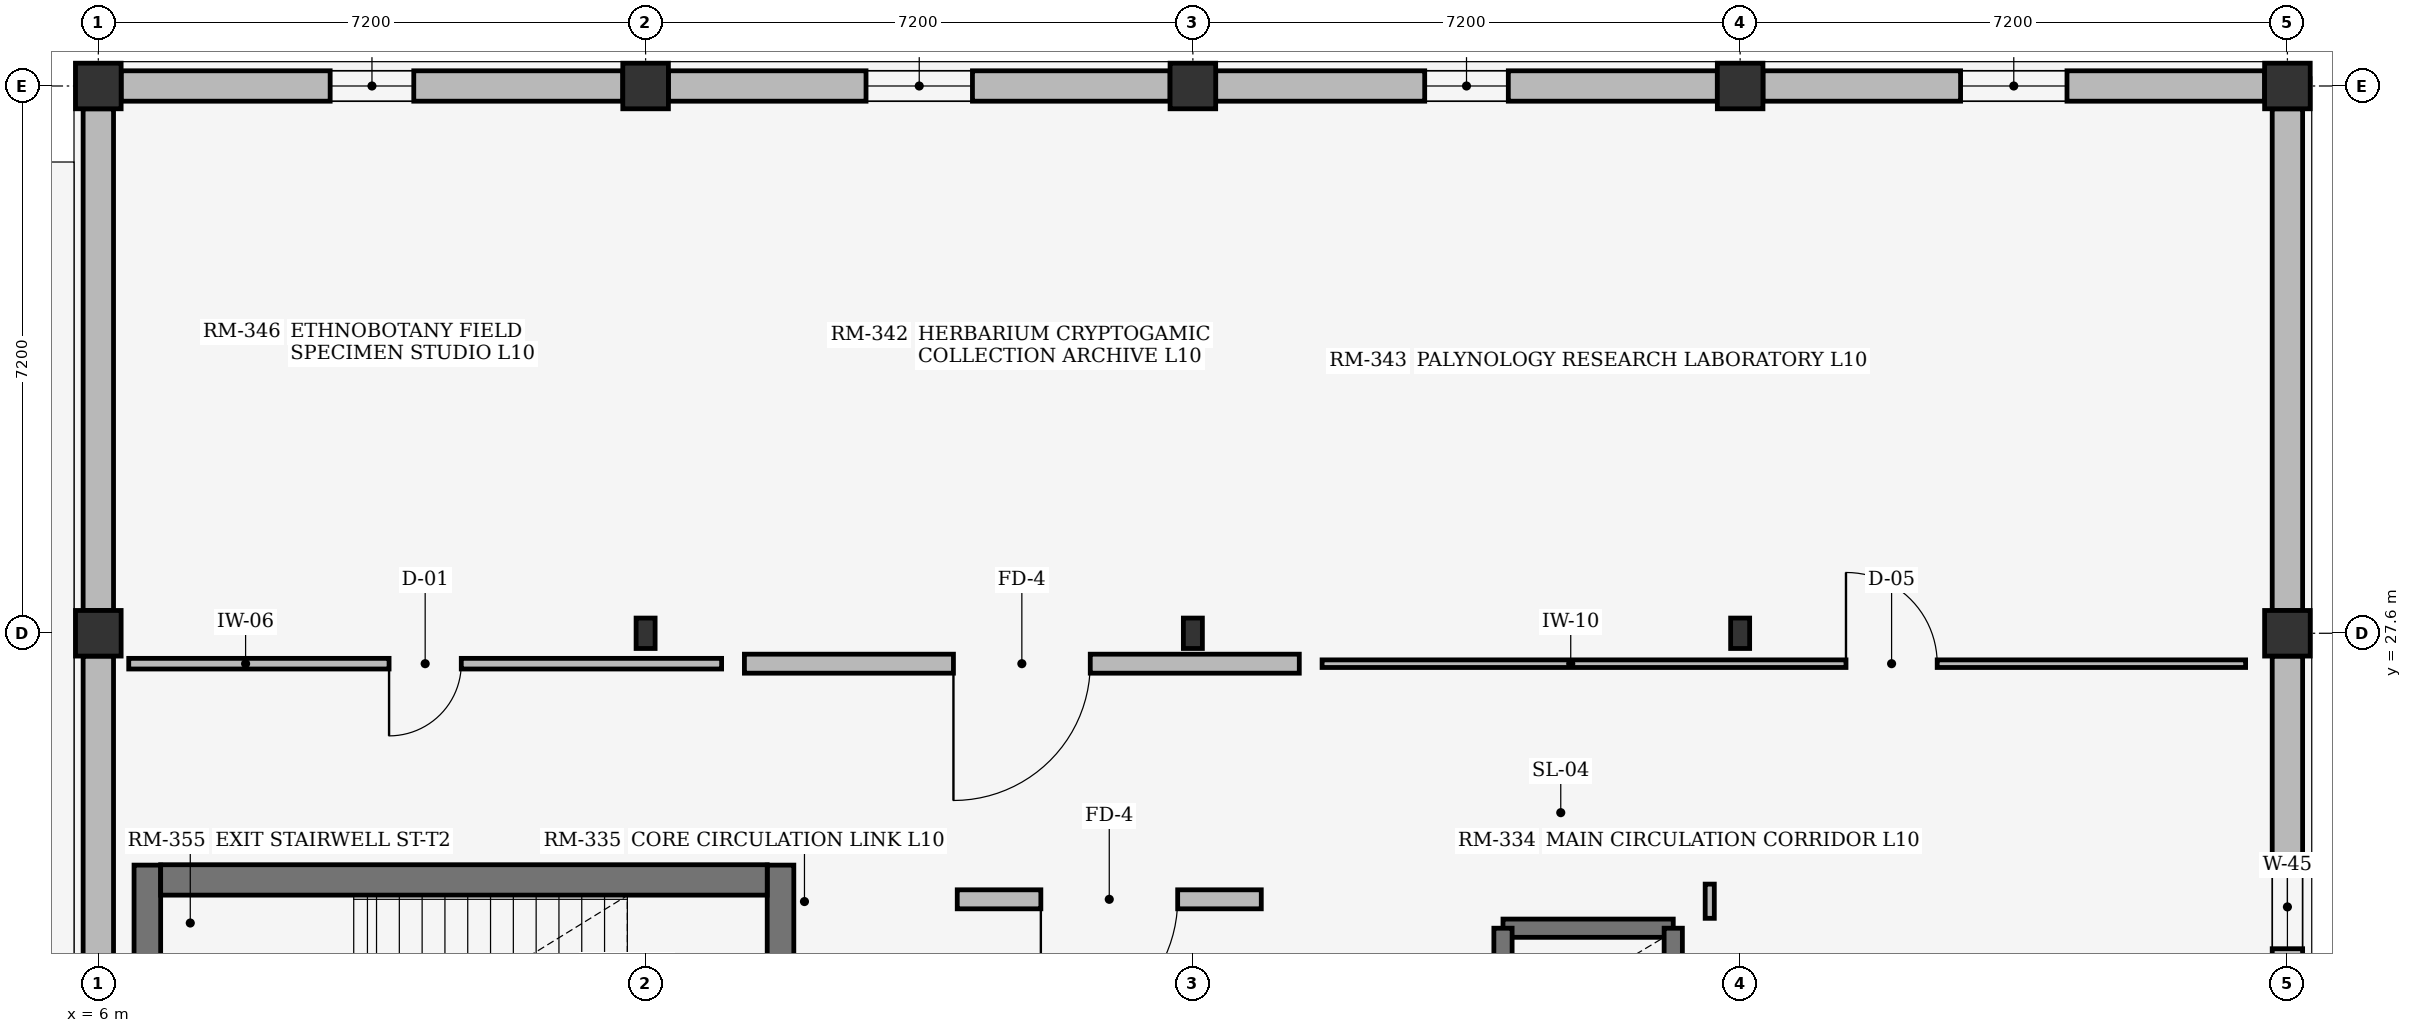
"""IFC4 building model, lengths in metres.
Left out: names, types, materials, properties, quantities, classifications, styles, units other than length and angle.
Written with IfcOpenShell. Run it as: python <this file> out.ifc"""

import sys

from ifc_helpers import new_model, si_unit, direction, frame, frame_2d, origin, origin_2d, place, context, subcontext, project, spatial, rectangle, i_section, extrude, element, fill, save


model = new_model("IFC4")
c1 = context("Model", 3, precision=1e-05, world=origin(), true_north=direction((0.0, 1.0)))
c2 = subcontext(c1, "Body", "Model", "MODEL_VIEW")
j1 = project(units=[si_unit("LENGTHUNIT", "METRE"), si_unit("PLANEANGLEUNIT", "RADIAN")], contexts=[c1])
p1 = place(None, origin())
s1 = spatial("IfcSite", under=j1, at=p1, CompositionType="ELEMENT")
p2 = place(p1, origin())
s2 = spatial("IfcBuilding", under=s1, at=p2, CompositionType="ELEMENT")
p3 = place(p2, frame((0.0, 0.0, 40.5)))
s3 = spatial("IfcBuildingStorey", under=s2, at=p3, CompositionType="ELEMENT", Elevation=40.5)
for number, where, z_axis, x_axis in (
    (1, (6.0, 27.6, 0.0), (0.0, 0.0, 1.0), (1.0, 0.0, 0.0)),
    (2, (6.0, 34.8, 0.0), (0.0, 0.0, 1.0), (1.0, 0.0, 0.0)),
):
    element("IfcColumn", number, at=place(p3, frame(where, z_axis=z_axis, x_axis=x_axis)), inside=s3, PredefinedType="COLUMN", context=c2, shape_type="SweptSolid", body=[
        extrude(rectangle(XDim=0.6, YDim=0.6, at=origin_2d()), origin(), (0.0, 0.0, 1.0), 3.68),
    ])
p4 = place(p3, frame((13.2, 27.6, 0.0), z_axis=(0.0, 0.0, 1.0), x_axis=(1.0, 0.0, 0.0)))
e3 = element("IfcColumn", 3, at=p4, inside=s3, PredefinedType="COLUMN", context=c2, shape_type="SweptSolid", body=[
    extrude(i_section(OverallWidth=0.25, OverallDepth=0.4, WebThickness=0.01, FlangeThickness=0.013, at=origin_2d()), origin(), (0.0, 0.0, 1.0), 3.68),
])
p5 = place(p3, frame((13.2, 34.8, 0.0), z_axis=(0.0, 0.0, 1.0), x_axis=(1.0, 0.0, 0.0)))
e4 = element("IfcColumn", 4, at=p5, inside=s3, PredefinedType="COLUMN", context=c2, shape_type="SweptSolid", body=[
    extrude(rectangle(XDim=0.6, YDim=0.6, at=origin_2d()), origin(), (0.0, 0.0, 1.0), 3.68),
])
p6 = place(p3, frame((20.4, 27.6, 0.0), z_axis=(0.0, 0.0, 1.0), x_axis=(1.0, 0.0, 0.0)))
e5 = element("IfcColumn", 5, at=p6, inside=s3, PredefinedType="COLUMN", context=c2, shape_type="SweptSolid", body=[
    extrude(i_section(OverallWidth=0.25, OverallDepth=0.4, WebThickness=0.01, FlangeThickness=0.013, at=origin_2d()), origin(), (0.0, 0.0, 1.0), 3.68),
])
p7 = place(p3, frame((20.4, 34.8, 0.0), z_axis=(0.0, 0.0, 1.0), x_axis=(1.0, 0.0, 0.0)))
e6 = element("IfcColumn", 6, at=p7, inside=s3, PredefinedType="COLUMN", context=c2, shape_type="SweptSolid", body=[
    extrude(rectangle(XDim=0.6, YDim=0.6, at=origin_2d()), origin(), (0.0, 0.0, 1.0), 3.68),
])
p8 = place(p3, frame((27.6, 27.6, 0.0), z_axis=(0.0, 0.0, 1.0), x_axis=(1.0, 0.0, 0.0)))
e7 = element("IfcColumn", 7, at=p8, inside=s3, PredefinedType="COLUMN", context=c2, shape_type="SweptSolid", body=[
    extrude(i_section(OverallWidth=0.25, OverallDepth=0.4, WebThickness=0.01, FlangeThickness=0.013, at=origin_2d()), origin(), (0.0, 0.0, 1.0), 3.68),
])
for number, where, z_axis, x_axis in (
    (8, (27.6, 34.8, 0.0), (0.0, 0.0, 1.0), (1.0, 0.0, 0.0)),
    (9, (34.8, 27.6, 0.0), (0.0, 0.0, 1.0), (1.0, 0.0, 0.0)),
    (10, (34.8, 34.8, 0.0), (0.0, 0.0, 1.0), (1.0, 0.0, 0.0)),
):
    element("IfcColumn", number, at=place(p3, frame(where, z_axis=z_axis, x_axis=x_axis)), inside=s3, PredefinedType="COLUMN", context=c2, shape_type="SweptSolid", body=[
        extrude(rectangle(XDim=0.6, YDim=0.6, at=origin_2d()), origin(), (0.0, 0.0, 1.0), 3.68),
    ])
p9 = place(p3, frame((6.3, 34.8, 0.0), z_axis=(0.0, 0.0, 1.0), x_axis=(1.0, 0.0, 0.0)))
e11 = element("IfcWall", 11, at=p9, inside=s3, PredefinedType="STANDARD", context=c2, shape_type="SweptSolid", body=[
    extrude(rectangle(XDim=6.6, YDim=0.4, at=frame_2d((3.3, 0.0))), origin(), (0.0, 0.0, 1.0), 3.16),
])
p10 = place(p9, frame((2.75, 0.0, 0.75)))
e12 = element("IfcOpeningElement", 12, at=p10, cuts=e11, PredefinedType="OPENING", context=c2, shape_type="SweptSolid", body=[
    extrude(rectangle(XDim=1.1, YDim=1.25, at=frame_2d((0.55, 0.625))), frame((0.0, 0.21, 0.0), z_axis=(0.0, -1.0, 0.0), x_axis=(1.0, 0.0, 0.0)), (0.0, 0.0, 1.0), 0.42),
])
p11 = place(p3, frame((13.5, 34.8, 0.0), z_axis=(0.0, 0.0, 1.0), x_axis=(1.0, 0.0, 0.0)))
e13 = element("IfcWall", 13, at=p11, inside=s3, PredefinedType="STANDARD", context=c2, shape_type="SweptSolid", body=[
    extrude(rectangle(XDim=6.6, YDim=0.4, at=frame_2d((3.3, 0.0))), origin(), (0.0, 0.0, 1.0), 3.16),
])
p12 = place(p11, frame((2.6, 0.0, 0.75)))
e14 = element("IfcOpeningElement", 14, at=p12, cuts=e13, PredefinedType="OPENING", context=c2, shape_type="SweptSolid", body=[
    extrude(rectangle(XDim=1.4, YDim=1.25, at=frame_2d((0.7, 0.625))), frame((0.0, 0.21, 0.0), z_axis=(0.0, -1.0, 0.0), x_axis=(1.0, 0.0, 0.0)), (0.0, 0.0, 1.0), 0.42),
])
p13 = place(p3, frame((20.7, 34.8, 0.0), z_axis=(0.0, 0.0, 1.0), x_axis=(1.0, 0.0, 0.0)))
e15 = element("IfcWall", 15, at=p13, inside=s3, PredefinedType="STANDARD", context=c2, shape_type="SweptSolid", body=[
    extrude(rectangle(XDim=6.6, YDim=0.4, at=frame_2d((3.3, 0.0))), origin(), (0.0, 0.0, 1.0), 3.16),
])
p14 = place(p13, frame((2.75, 0.0, 0.75)))
e16 = element("IfcOpeningElement", 16, at=p14, cuts=e15, PredefinedType="OPENING", context=c2, shape_type="SweptSolid", body=[
    extrude(rectangle(XDim=1.1, YDim=1.25, at=frame_2d((0.55, 0.625))), frame((0.0, 0.21, 0.0), z_axis=(0.0, -1.0, 0.0), x_axis=(1.0, 0.0, 0.0)), (0.0, 0.0, 1.0), 0.42),
])
p15 = place(p3, frame((27.9, 34.8, 0.0), z_axis=(0.0, 0.0, 1.0), x_axis=(1.0, 0.0, 0.0)))
e17 = element("IfcWall", 17, at=p15, inside=s3, PredefinedType="STANDARD", context=c2, shape_type="SweptSolid", body=[
    extrude(rectangle(XDim=6.6, YDim=0.4, at=frame_2d((3.3, 0.0))), origin(), (0.0, 0.0, 1.0), 3.16),
])
p16 = place(p15, frame((2.6, 0.0, 0.75)))
e18 = element("IfcOpeningElement", 18, at=p16, cuts=e17, PredefinedType="OPENING", context=c2, shape_type="SweptSolid", body=[
    extrude(rectangle(XDim=1.4, YDim=1.25, at=frame_2d((0.7, 0.625))), frame((0.0, 0.21, 0.0), z_axis=(0.0, -1.0, 0.0), x_axis=(1.0, 0.0, 0.0)), (0.0, 0.0, 1.0), 0.42),
])
for number, where, z_axis, x_axis in (
    (19, (6.0, 20.7, 0.0), (0.0, 0.0, 1.0), (0.0, 1.0, 0.0)),
    (20, (6.0, 27.9, 0.0), (0.0, 0.0, 1.0), (0.0, 1.0, 0.0)),
):
    element("IfcWall", number, at=place(p3, frame(where, z_axis=z_axis, x_axis=x_axis)), inside=s3, PredefinedType="STANDARD", context=c2, shape_type="SweptSolid", body=[
        extrude(rectangle(XDim=6.6, YDim=0.4, at=frame_2d((3.3, 0.0))), origin(), (0.0, 0.0, 1.0), 3.16),
    ])
p17 = place(p3, frame((34.8, 20.7, 0.0), z_axis=(0.0, 0.0, 1.0), x_axis=(0.0, 1.0, 0.0)))
e21 = element("IfcWall", 21, at=p17, inside=s3, PredefinedType="STANDARD", context=c2, shape_type="SweptSolid", body=[
    extrude(rectangle(XDim=6.6, YDim=0.4, at=frame_2d((3.3, 0.0))), origin(), (0.0, 0.0, 1.0), 3.16),
])
p18 = place(p17, frame((2.75, 0.0, 0.75)))
e22 = element("IfcOpeningElement", 22, at=p18, cuts=e21, PredefinedType="OPENING", context=c2, shape_type="SweptSolid", body=[
    extrude(rectangle(XDim=1.1, YDim=1.25, at=frame_2d((0.55, 0.625))), frame((0.0, 0.21, 0.0), z_axis=(0.0, -1.0, 0.0), x_axis=(1.0, 0.0, 0.0)), (0.0, 0.0, 1.0), 0.42),
])
p19 = place(p3, frame((34.8, 27.9, 0.0), z_axis=(0.0, 0.0, 1.0), x_axis=(0.0, 1.0, 0.0)))
e23 = element("IfcWall", 23, at=p19, inside=s3, PredefinedType="STANDARD", context=c2, shape_type="SweptSolid", body=[
    extrude(rectangle(XDim=6.6, YDim=0.4, at=frame_2d((3.3, 0.0))), origin(), (0.0, 0.0, 1.0), 3.16),
])
p20 = place(p3, frame((14.975, 24.55, 0.0), z_axis=(0.0, 0.0, 1.0), x_axis=(0.0, -1.0, 0.0)))
e24 = element("IfcWall", 24, at=p20, inside=s3, PredefinedType="SHEAR", context=c2, shape_type="SweptSolid", body=[
    extrude(rectangle(XDim=4.59, YDim=0.35, at=frame_2d((2.295, 0.0))), origin(), (0.0, 0.0, 1.0), 3.68),
])
p21 = place(p20, frame((1.72, 0.0, 0.0)))
e25 = element("IfcOpeningElement", 25, at=p21, cuts=e24, PredefinedType="OPENING", context=c2, shape_type="SweptSolid", body=[
    extrude(rectangle(XDim=1.15, YDim=2.2, at=frame_2d((0.575, 1.1))), frame((0.0, 0.185, 0.0), z_axis=(0.0, -1.0, 0.0), x_axis=(1.0, 0.0, 0.0)), (0.0, 0.0, 1.0), 0.37),
])
p22 = place(p3, frame((6.645, 24.55, 0.0), z_axis=(0.0, 0.0, 1.0), x_axis=(0.0, -1.0, 0.0)))
e26 = element("IfcWall", 26, at=p22, inside=s3, PredefinedType="SHEAR", context=c2, shape_type="SweptSolid", body=[
    extrude(rectangle(XDim=4.59, YDim=0.35, at=frame_2d((2.295, 0.0))), origin(), (0.0, 0.0, 1.0), 3.68),
])
p23 = place(p3, frame((14.8, 24.355, 0.0), z_axis=(0.0, 0.0, 1.0), x_axis=(-1.0, 0.0, 0.0)))
e27 = element("IfcWall", 27, at=p23, inside=s3, PredefinedType="SHEAR", context=c2, shape_type="SweptSolid", body=[
    extrude(rectangle(XDim=7.98, YDim=0.4, at=frame_2d((3.99, 0.0))), origin(), (0.0, 0.0, 1.0), 3.68),
])
p24 = place(p3, frame((24.48, 23.72, 0.0), z_axis=(0.0, 0.0, 1.0), x_axis=(1.0, 0.0, 0.0)))
e28 = element("IfcWall", 28, at=p24, inside=s3, PredefinedType="SHEAR", context=c2, shape_type="SweptSolid", body=[
    extrude(rectangle(XDim=2.24, YDim=0.24, at=frame_2d((1.12, 0.0))), origin(), (0.0, 0.0, 1.0), 3.68),
])
for number, where, z_axis, x_axis in (
    (29, (24.48, 20.78, 0.0), (0.0, 0.0, 1.0), (0.0, 1.0, 0.0)),
    (30, (26.72, 20.78, 0.0), (0.0, 0.0, 1.0), (0.0, 1.0, 0.0)),
):
    element("IfcWall", number, at=place(p3, frame(where, z_axis=z_axis, x_axis=x_axis)), inside=s3, PredefinedType="SHEAR", context=c2, shape_type="SweptSolid", body=[
        extrude(rectangle(XDim=2.94, YDim=0.24, at=frame_2d((1.47, 0.0))), origin(), (0.0, 0.0, 1.0), 3.68),
    ])
p25 = place(p3, frame((17.3, 24.1, 0.0), z_axis=(0.0, 0.0, 1.0), x_axis=(1.0, 0.0, 0.0)))
e31 = element("IfcWall", 31, at=p25, inside=s3, PredefinedType="SOLIDWALL", context=c2, shape_type="SweptSolid", body=[
    extrude(rectangle(XDim=4.0, YDim=0.25, at=frame_2d((2.0, 0.0))), origin(), (0.0, 0.0, 1.0), 3.66),
])
p26 = place(p25, frame((1.1, 0.0, 0.0)))
e32 = element("IfcOpeningElement", 32, at=p26, cuts=e31, PredefinedType="OPENING", context=c2, shape_type="SweptSolid", body=[
    extrude(rectangle(XDim=1.8, YDim=2.25, at=frame_2d((0.9, 1.125))), frame((0.0, 0.135, 0.0), z_axis=(0.0, -1.0, 0.0), x_axis=(1.0, 0.0, 0.0)), (0.0, 0.0, 1.0), 0.27),
])
p27 = place(p3, frame((6.4, 27.2, 0.0), z_axis=(0.0, 0.0, 1.0), x_axis=(1.0, 0.0, 0.0)))
e33 = element("IfcWall", 33, at=p27, inside=s3, PredefinedType="PARTITIONING", context=c2, shape_type="SweptSolid", body=[
    extrude(rectangle(XDim=7.8, YDim=0.14, at=frame_2d((3.9, 0.0))), origin(), (0.0, 0.0, 1.0), 3.66),
])
p28 = place(p27, frame((3.425, 0.0, 0.0)))
e34 = element("IfcOpeningElement", 34, at=p28, cuts=e33, PredefinedType="OPENING", context=c2, shape_type="SweptSolid", body=[
    extrude(rectangle(XDim=0.95, YDim=2.15, at=frame_2d((0.475, 1.075))), frame((0.0, 0.08, 0.0), z_axis=(0.0, -1.0, 0.0), x_axis=(1.0, 0.0, 0.0)), (0.0, 0.0, 1.0), 0.16),
])
p29 = place(p3, frame((27.2, 24.3, 0.0), z_axis=(0.0, 0.0, 1.0), x_axis=(0.0, -1.0, 0.0)))
e35 = element("IfcWall", 35, at=p29, inside=s3, PredefinedType="PARTITIONING", context=c2, shape_type="SweptSolid", body=[
    extrude(rectangle(XDim=0.45, YDim=0.12, at=frame_2d((0.225, 0.0))), origin(), (0.0, 0.0, 1.0), 3.66),
])
p30 = place(p3, frame((14.5, 27.2, 0.0), z_axis=(0.0, 0.0, 1.0), x_axis=(1.0, 0.0, 0.0)))
e36 = element("IfcWall", 36, at=p30, inside=s3, PredefinedType="SOLIDWALL", context=c2, shape_type="SweptSolid", body=[
    extrude(rectangle(XDim=7.3, YDim=0.25, at=frame_2d((3.65, 0.0))), origin(), (0.0, 0.0, 1.0), 3.66),
])
p31 = place(p30, frame((2.75, 0.0, 0.0)))
e37 = element("IfcOpeningElement", 37, at=p31, cuts=e36, PredefinedType="OPENING", context=c2, shape_type="SweptSolid", body=[
    extrude(rectangle(XDim=1.8, YDim=2.25, at=frame_2d((0.9, 1.125))), frame((0.0, 0.135, 0.0), z_axis=(0.0, -1.0, 0.0), x_axis=(1.0, 0.0, 0.0)), (0.0, 0.0, 1.0), 0.27),
])
p32 = place(p3, frame((22.1, 27.2, 0.0), z_axis=(0.0, 0.0, 1.0), x_axis=(1.0, 0.0, 0.0)))
e38 = element("IfcWall", 38, at=p32, inside=s3, PredefinedType="PARTITIONING", context=c2, shape_type="SweptSolid", body=[
    extrude(rectangle(XDim=12.15, YDim=0.1, at=frame_2d((6.075, 0.0))), origin(), (0.0, 0.0, 1.0), 3.66),
])
p33 = place(p32, frame((6.893, 0.0, 0.0)))
e39 = element("IfcOpeningElement", 39, at=p33, cuts=e38, PredefinedType="OPENING", context=c2, shape_type="SweptSolid", body=[
    extrude(rectangle(XDim=1.2, YDim=2.2, at=frame_2d((0.6, 1.1))), frame((0.0, 0.06, 0.0), z_axis=(0.0, -1.0, 0.0), x_axis=(1.0, 0.0, 0.0)), (0.0, 0.0, 1.0), 0.12),
])
p34 = place(p10, origin())
e40 = element("IfcWindow", 40, at=p34, inside=s3, PartitioningType="SINGLE_PANEL", PredefinedType="WINDOW", context=c2, shape_type="SweptSolid", body=[
    extrude(rectangle(XDim=1.1, YDim=1.25, at=frame_2d((0.55, 0.625))), frame((0.0, 0.03, 0.0), z_axis=(0.0, -1.0, 0.0), x_axis=(1.0, 0.0, 0.0)), (0.0, 0.0, 1.0), 0.06),
])
fill(e12, e40)
p35 = place(p12, origin())
e41 = element("IfcWindow", 41, at=p35, inside=s3, PartitioningType="SINGLE_PANEL", PredefinedType="WINDOW", context=c2, shape_type="SweptSolid", body=[
    extrude(rectangle(XDim=1.4, YDim=1.25, at=frame_2d((0.7, 0.625))), frame((0.0, 0.03, 0.0), z_axis=(0.0, -1.0, 0.0), x_axis=(1.0, 0.0, 0.0)), (0.0, 0.0, 1.0), 0.06),
])
fill(e14, e41)
p36 = place(p14, origin())
e42 = element("IfcWindow", 42, at=p36, inside=s3, PartitioningType="SINGLE_PANEL", PredefinedType="WINDOW", context=c2, shape_type="SweptSolid", body=[
    extrude(rectangle(XDim=1.1, YDim=1.25, at=frame_2d((0.55, 0.625))), frame((0.0, 0.03, 0.0), z_axis=(0.0, -1.0, 0.0), x_axis=(1.0, 0.0, 0.0)), (0.0, 0.0, 1.0), 0.06),
])
fill(e16, e42)
p37 = place(p16, origin())
e43 = element("IfcWindow", 43, at=p37, inside=s3, PartitioningType="SINGLE_PANEL", PredefinedType="WINDOW", context=c2, shape_type="SweptSolid", body=[
    extrude(rectangle(XDim=1.4, YDim=1.25, at=frame_2d((0.7, 0.625))), frame((0.0, 0.03, 0.0), z_axis=(0.0, -1.0, 0.0), x_axis=(1.0, 0.0, 0.0)), (0.0, 0.0, 1.0), 0.06),
])
fill(e18, e43)
p38 = place(p18, origin())
e44 = element("IfcWindow", 44, at=p38, inside=s3, PartitioningType="SINGLE_PANEL", PredefinedType="WINDOW", context=c2, shape_type="SweptSolid", body=[
    extrude(rectangle(XDim=1.1, YDim=1.25, at=frame_2d((0.55, 0.625))), frame((0.0, 0.03, 0.0), z_axis=(0.0, -1.0, 0.0), x_axis=(1.0, 0.0, 0.0)), (0.0, 0.0, 1.0), 0.06),
])
fill(e22, e44)
p39 = place(p26, frame((1.8, 0.0, 0.0), z_axis=(0.0, 0.0, 1.0), x_axis=(-1.0, 0.0, 0.0)))
e45 = element("IfcDoor", 45, at=p39, inside=s3, OperationType="DOUBLE_DOOR_SINGLE_SWING", PredefinedType="DOOR", context=c2, shape_type="SweptSolid", body=[
    extrude(rectangle(XDim=1.8, YDim=2.25, at=frame_2d((0.9, 1.125))), frame((0.0, 0.025, 0.0), z_axis=(0.0, -1.0, 0.0), x_axis=(1.0, 0.0, 0.0)), (0.0, 0.0, 1.0), 0.05),
])
fill(e32, e45)
p40 = place(p28, frame((0.95, 0.0, 0.0), z_axis=(0.0, 0.0, 1.0), x_axis=(-1.0, 0.0, 0.0)))
e46 = element("IfcDoor", 46, at=p40, inside=s3, OperationType="SINGLE_SWING_LEFT", PredefinedType="DOOR", context=c2, shape_type="SweptSolid", body=[
    extrude(rectangle(XDim=0.95, YDim=2.15, at=frame_2d((0.475, 1.075))), frame((0.0, 0.025, 0.0), z_axis=(0.0, -1.0, 0.0), x_axis=(1.0, 0.0, 0.0)), (0.0, 0.0, 1.0), 0.05),
])
fill(e34, e46)
p41 = place(p31, frame((1.8, 0.0, 0.0), z_axis=(0.0, 0.0, 1.0), x_axis=(-1.0, 0.0, 0.0)))
e47 = element("IfcDoor", 47, at=p41, inside=s3, OperationType="DOUBLE_DOOR_SINGLE_SWING", PredefinedType="DOOR", context=c2, shape_type="SweptSolid", body=[
    extrude(rectangle(XDim=1.8, YDim=2.25, at=frame_2d((0.9, 1.125))), frame((0.0, 0.025, 0.0), z_axis=(0.0, -1.0, 0.0), x_axis=(1.0, 0.0, 0.0)), (0.0, 0.0, 1.0), 0.05),
])
fill(e37, e47)
p42 = place(p33, origin())
e48 = element("IfcDoor", 48, at=p42, inside=s3, OperationType="SINGLE_SWING_LEFT", PredefinedType="DOOR", context=c2, shape_type="SweptSolid", body=[
    extrude(rectangle(XDim=1.2, YDim=2.2, at=frame_2d((0.6, 1.1))), frame((0.0, 0.025, 0.0), z_axis=(0.0, -1.0, 0.0), x_axis=(1.0, 0.0, 0.0)), (0.0, 0.0, 1.0), 0.05),
])
fill(e39, e48)
save(model, sys.argv[1])
